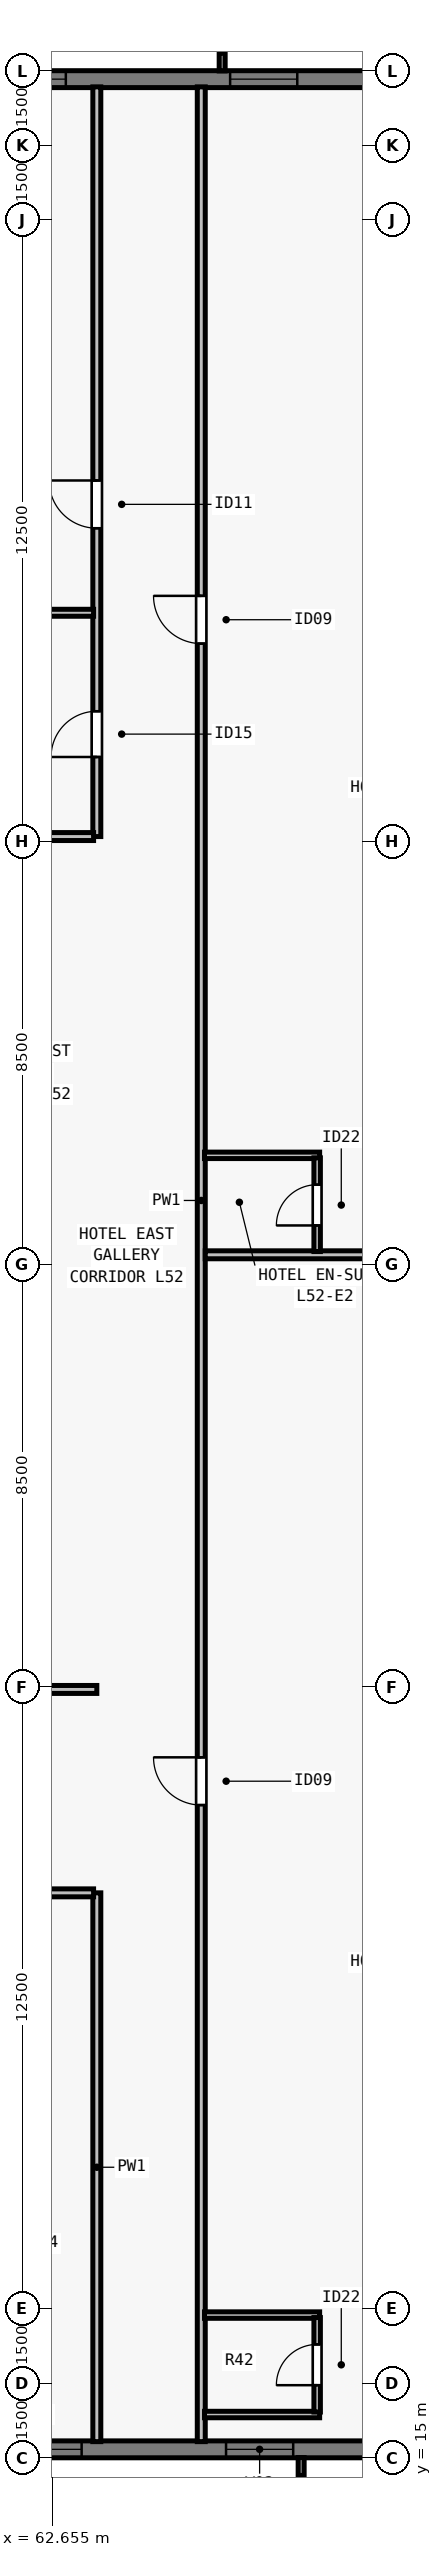
"""IFC4 building model, lengths in metres.
Left out: names, types, materials, properties, quantities, classifications, styles, units other than length and angle.
Written with IfcOpenShell. Run it as: python <this file> out.ifc"""

import sys

from ifc_helpers import new_model, si_unit, direction, frame, frame_2d, origin, place, context, subcontext, project, spatial, rectangle, extrude, element, fill, save


model = new_model("IFC4")
c1 = context("Model", 3, precision=1e-05, world=origin(), true_north=direction((0.0, 1.0)))
c2 = subcontext(c1, "Body", "Model", "MODEL_VIEW")
j1 = project(units=[si_unit("LENGTHUNIT", "METRE"), si_unit("PLANEANGLEUNIT", "RADIAN")], contexts=[c1])
p1 = place(None, origin())
s1 = spatial("IfcSite", under=j1, at=p1, CompositionType="ELEMENT")
p2 = place(p1, origin())
s2 = spatial("IfcBuilding", under=s1, at=p2, CompositionType="ELEMENT")
p3 = place(p2, frame((0.0, 0.0, 190.0)))
s3 = spatial("IfcBuildingStorey", under=s2, at=p3, CompositionType="ELEMENT", Elevation=190.0)
p4 = place(p3, frame((72.0, 15.17, 0.0), z_axis=(0.0, 0.0, 1.0), x_axis=(-1.0, 0.0, 0.0)))
e1 = element("IfcWall", 1, at=p4, inside=s3, PredefinedType="SOLIDWALL", context=c2, shape_type="SweptSolid", body=[
    extrude(rectangle(XDim=39.682, YDim=0.34, at=frame_2d((19.841, 0.0))), origin(), (0.0, 0.0, 1.0), 3.24),
])
p5 = place(p4, frame((4.502, 0.0, 0.8)))
e2 = element("IfcOpeningElement", 2, at=p5, cuts=e1, PredefinedType="OPENING", context=c2, shape_type="SweptSolid", body=[
    extrude(rectangle(XDim=1.35, YDim=1.62, at=frame_2d((0.675, 0.81))), frame((0.0, 0.18, 0.0), z_axis=(0.0, -1.0, 0.0), x_axis=(1.0, 0.0, 0.0)), (0.0, 0.0, 1.0), 0.36),
])
p6 = place(p4, frame((8.755, 0.0, 0.8)))
e3 = element("IfcOpeningElement", 3, at=p6, cuts=e1, PredefinedType="OPENING", context=c2, shape_type="SweptSolid", body=[
    extrude(rectangle(XDim=1.75, YDim=1.62, at=frame_2d((0.875, 0.81))), frame((0.0, 0.18, 0.0), z_axis=(0.0, -1.0, 0.0), x_axis=(1.0, 0.0, 0.0)), (0.0, 0.0, 1.0), 0.36),
])
p7 = place(p4, frame((12.059, 0.0, 0.8)))
e4 = element("IfcOpeningElement", 4, at=p7, cuts=e1, PredefinedType="OPENING", context=c2, shape_type="SweptSolid", body=[
    extrude(rectangle(XDim=1.35, YDim=1.62, at=frame_2d((0.675, 0.81))), frame((0.0, 0.18, 0.0), z_axis=(0.0, -1.0, 0.0), x_axis=(1.0, 0.0, 0.0)), (0.0, 0.0, 1.0), 0.36),
])
p8 = place(p4, frame((16.262, 0.0, 0.8)))
e5 = element("IfcOpeningElement", 5, at=p8, cuts=e1, PredefinedType="OPENING", context=c2, shape_type="SweptSolid", body=[
    extrude(rectangle(XDim=1.75, YDim=1.62, at=frame_2d((0.875, 0.81))), frame((0.0, 0.18, 0.0), z_axis=(0.0, -1.0, 0.0), x_axis=(1.0, 0.0, 0.0)), (0.0, 0.0, 1.0), 0.36),
])
p9 = place(p4, frame((20.016, 0.0, 0.8)))
e6 = element("IfcOpeningElement", 6, at=p9, cuts=e1, PredefinedType="OPENING", context=c2, shape_type="SweptSolid", body=[
    extrude(rectangle(XDim=1.35, YDim=1.62, at=frame_2d((0.675, 0.81))), frame((0.0, 0.18, 0.0), z_axis=(0.0, -1.0, 0.0), x_axis=(1.0, 0.0, 0.0)), (0.0, 0.0, 1.0), 0.36),
])
p10 = place(p4, frame((22.07, 0.0, 0.8)))
e7 = element("IfcOpeningElement", 7, at=p10, cuts=e1, PredefinedType="OPENING", context=c2, shape_type="SweptSolid", body=[
    extrude(rectangle(XDim=1.75, YDim=1.62, at=frame_2d((0.875, 0.81))), frame((0.0, 0.18, 0.0), z_axis=(0.0, -1.0, 0.0), x_axis=(1.0, 0.0, 0.0)), (0.0, 0.0, 1.0), 0.36),
])
p11 = place(p4, frame((26.273, 0.0, 0.8)))
e8 = element("IfcOpeningElement", 8, at=p11, cuts=e1, PredefinedType="OPENING", context=c2, shape_type="SweptSolid", body=[
    extrude(rectangle(XDim=1.35, YDim=1.62, at=frame_2d((0.675, 0.81))), frame((0.0, 0.18, 0.0), z_axis=(0.0, -1.0, 0.0), x_axis=(1.0, 0.0, 0.0)), (0.0, 0.0, 1.0), 0.36),
])
p12 = place(p4, frame((28.377, 0.0, 0.8)))
e9 = element("IfcOpeningElement", 9, at=p12, cuts=e1, PredefinedType="OPENING", context=c2, shape_type="SweptSolid", body=[
    extrude(rectangle(XDim=1.75, YDim=1.62, at=frame_2d((0.875, 0.81))), frame((0.0, 0.18, 0.0), z_axis=(0.0, -1.0, 0.0), x_axis=(1.0, 0.0, 0.0)), (0.0, 0.0, 1.0), 0.36),
])
p13 = place(p4, frame((33.38, 0.0, 0.8)))
e10 = element("IfcOpeningElement", 10, at=p13, cuts=e1, PredefinedType="OPENING", context=c2, shape_type="SweptSolid", body=[
    extrude(rectangle(XDim=1.35, YDim=1.62, at=frame_2d((0.675, 0.81))), frame((0.0, 0.18, 0.0), z_axis=(0.0, -1.0, 0.0), x_axis=(1.0, 0.0, 0.0)), (0.0, 0.0, 1.0), 0.36),
])
p14 = place(p3, frame((32.0, 62.83, 0.0), z_axis=(0.0, 0.0, 1.0), x_axis=(1.0, 0.0, 0.0)))
e11 = element("IfcWall", 11, at=p14, inside=s3, PredefinedType="SOLIDWALL", context=c2, shape_type="SweptSolid", body=[
    extrude(rectangle(XDim=39.682, YDim=0.34, at=frame_2d((19.841, 0.0))), origin(), (0.0, 0.0, 1.0), 3.24),
])
p15 = place(p14, frame((4.952, 0.0, 0.8)))
e12 = element("IfcOpeningElement", 12, at=p15, cuts=e11, PredefinedType="OPENING", context=c2, shape_type="SweptSolid", body=[
    extrude(rectangle(XDim=1.35, YDim=1.62, at=frame_2d((0.675, 0.81))), frame((0.0, 0.18, 0.0), z_axis=(0.0, -1.0, 0.0), x_axis=(1.0, 0.0, 0.0)), (0.0, 0.0, 1.0), 0.36),
])
p16 = place(p14, frame((12.059, 0.0, 0.8)))
e13 = element("IfcOpeningElement", 13, at=p16, cuts=e11, PredefinedType="OPENING", context=c2, shape_type="SweptSolid", body=[
    extrude(rectangle(XDim=1.35, YDim=1.62, at=frame_2d((0.675, 0.81))), frame((0.0, 0.18, 0.0), z_axis=(0.0, -1.0, 0.0), x_axis=(1.0, 0.0, 0.0)), (0.0, 0.0, 1.0), 0.36),
])
p17 = place(p14, frame((16.262, 0.0, 0.8)))
e14 = element("IfcOpeningElement", 14, at=p17, cuts=e11, PredefinedType="OPENING", context=c2, shape_type="SweptSolid", body=[
    extrude(rectangle(XDim=1.75, YDim=1.62, at=frame_2d((0.875, 0.81))), frame((0.0, 0.18, 0.0), z_axis=(0.0, -1.0, 0.0), x_axis=(1.0, 0.0, 0.0)), (0.0, 0.0, 1.0), 0.36),
])
p18 = place(p14, frame((19.166, 0.0, 0.8)))
e15 = element("IfcOpeningElement", 15, at=p18, cuts=e11, PredefinedType="OPENING", context=c2, shape_type="SweptSolid", body=[
    extrude(rectangle(XDim=1.35, YDim=1.62, at=frame_2d((0.675, 0.81))), frame((0.0, 0.18, 0.0), z_axis=(0.0, -1.0, 0.0), x_axis=(1.0, 0.0, 0.0)), (0.0, 0.0, 1.0), 0.36),
])
p19 = place(p14, frame((22.07, 0.0, 0.8)))
e16 = element("IfcOpeningElement", 16, at=p19, cuts=e11, PredefinedType="OPENING", context=c2, shape_type="SweptSolid", body=[
    extrude(rectangle(XDim=1.75, YDim=1.62, at=frame_2d((0.875, 0.81))), frame((0.0, 0.18, 0.0), z_axis=(0.0, -1.0, 0.0), x_axis=(1.0, 0.0, 0.0)), (0.0, 0.0, 1.0), 0.36),
])
p20 = place(p14, frame((26.273, 0.0, 0.8)))
e17 = element("IfcOpeningElement", 17, at=p20, cuts=e11, PredefinedType="OPENING", context=c2, shape_type="SweptSolid", body=[
    extrude(rectangle(XDim=1.35, YDim=1.62, at=frame_2d((0.675, 0.81))), frame((0.0, 0.18, 0.0), z_axis=(0.0, -1.0, 0.0), x_axis=(1.0, 0.0, 0.0)), (0.0, 0.0, 1.0), 0.36),
])
p21 = place(p14, frame((29.177, 0.0, 0.8)))
e18 = element("IfcOpeningElement", 18, at=p21, cuts=e11, PredefinedType="OPENING", context=c2, shape_type="SweptSolid", body=[
    extrude(rectangle(XDim=1.75, YDim=1.62, at=frame_2d((0.875, 0.81))), frame((0.0, 0.18, 0.0), z_axis=(0.0, -1.0, 0.0), x_axis=(1.0, 0.0, 0.0)), (0.0, 0.0, 1.0), 0.36),
])
p22 = place(p14, frame((34.23, 0.0, 0.8)))
e19 = element("IfcOpeningElement", 19, at=p22, cuts=e11, PredefinedType="OPENING", context=c2, shape_type="SweptSolid", body=[
    extrude(rectangle(XDim=1.35, YDim=1.62, at=frame_2d((0.675, 0.81))), frame((0.0, 0.18, 0.0), z_axis=(0.0, -1.0, 0.0), x_axis=(1.0, 0.0, 0.0)), (0.0, 0.0, 1.0), 0.36),
])
p23 = place(p3, frame((65.65, 15.325, 0.0), z_axis=(0.0, 0.0, 1.0), x_axis=(0.0, 1.0, 0.0)))
e20 = element("IfcWall", 20, at=p23, inside=s3, PredefinedType="PARTITIONING", context=c2, shape_type="SweptSolid", body=[
    extrude(rectangle(XDim=47.35, YDim=0.16, at=frame_2d((23.675, 0.0))), origin(), (0.0, 0.0, 1.0), 2.515),
])
p24 = place(p23, frame((12.8, 0.0, 0.0)))
e21 = element("IfcOpeningElement", 21, at=p24, cuts=e20, PredefinedType="OPENING", context=c2, shape_type="SweptSolid", body=[
    extrude(rectangle(XDim=0.96, YDim=2.15, at=frame_2d((0.48, 1.075))), frame((0.0, 0.09, 0.0), z_axis=(0.0, -1.0, 0.0), x_axis=(1.0, 0.0, 0.0)), (0.0, 0.0, 1.0), 0.18),
])
p25 = place(p23, frame((36.155, 0.0, 0.0)))
e22 = element("IfcOpeningElement", 22, at=p25, cuts=e20, PredefinedType="OPENING", context=c2, shape_type="SweptSolid", body=[
    extrude(rectangle(XDim=0.96, YDim=2.15, at=frame_2d((0.48, 1.075))), frame((0.0, 0.09, 0.0), z_axis=(0.0, -1.0, 0.0), x_axis=(1.0, 0.0, 0.0)), (0.0, 0.0, 1.0), 0.18),
])
p26 = place(p3, frame((63.55, 15.325, 0.0), z_axis=(0.0, 0.0, 1.0), x_axis=(0.0, 1.0, 0.0)))
e23 = element("IfcWall", 23, at=p26, inside=s3, PredefinedType="PARTITIONING", context=c2, shape_type="SweptSolid", body=[
    extrude(rectangle(XDim=11.035, YDim=0.16, at=frame_2d((5.518, 0.0))), origin(), (0.0, 0.0, 1.0), 3.24),
])
p27 = place(p3, frame((63.55, 47.6, 0.0), z_axis=(0.0, 0.0, 1.0), x_axis=(0.0, 1.0, 0.0)))
e24 = element("IfcWall", 24, at=p27, inside=s3, PredefinedType="PARTITIONING", context=c2, shape_type="SweptSolid", body=[
    extrude(rectangle(XDim=15.075, YDim=0.16, at=frame_2d((7.538, 0.0))), origin(), (0.0, 0.0, 1.0), 2.515),
])
p28 = place(p27, frame((1.6, 0.0, 0.0)))
e25 = element("IfcOpeningElement", 25, at=p28, cuts=e24, PredefinedType="OPENING", context=c2, shape_type="SweptSolid", body=[
    extrude(rectangle(XDim=0.92, YDim=2.12, at=frame_2d((0.46, 1.06))), frame((0.0, 0.09, 0.0), z_axis=(0.0, -1.0, 0.0), x_axis=(1.0, 0.0, 0.0)), (0.0, 0.0, 1.0), 0.18),
])
p29 = place(p27, frame((6.2, 0.0, 0.0)))
e26 = element("IfcOpeningElement", 26, at=p29, cuts=e24, PredefinedType="OPENING", context=c2, shape_type="SweptSolid", body=[
    extrude(rectangle(XDim=0.96, YDim=2.12, at=frame_2d((0.48, 1.06))), frame((0.0, 0.09, 0.0), z_axis=(0.0, -1.0, 0.0), x_axis=(1.0, 0.0, 0.0)), (0.0, 0.0, 1.0), 0.18),
])
p30 = place(p3, frame((60.765, 30.45, 0.0), z_axis=(0.0, 0.0, 1.0), x_axis=(1.0, 0.0, 0.0)))
e27 = element("IfcWall", 27, at=p30, inside=s3, PredefinedType="PARTITIONING", context=c2, shape_type="SweptSolid", body=[
    extrude(rectangle(XDim=2.785, YDim=0.16, at=frame_2d((1.393, 0.0))), origin(), (0.0, 0.0, 1.0), 3.24),
])
p31 = place(p3, frame((60.765, 47.6, 0.0), z_axis=(0.0, 0.0, 1.0), x_axis=(1.0, 0.0, 0.0)))
e28 = element("IfcWall", 28, at=p31, inside=s3, PredefinedType="PARTITIONING", context=c2, shape_type="SweptSolid", body=[
    extrude(rectangle(XDim=2.72, YDim=0.16, at=frame_2d((1.36, 0.0))), origin(), (0.0, 0.0, 1.0), 3.24),
])
p32 = place(p3, frame((41.415, 26.36, 0.0), z_axis=(0.0, 0.0, 1.0), x_axis=(1.0, 0.0, 0.0)))
e29 = element("IfcWall", 29, at=p32, inside=s3, PredefinedType="PARTITIONING", context=c2, shape_type="SweptSolid", body=[
    extrude(rectangle(XDim=22.07, YDim=0.16, at=frame_2d((11.035, 0.0))), origin(), (0.0, 0.0, 1.0), 3.24),
])
p33 = place(p32, frame((3.331, 0.0, 0.0)))
e30 = element("IfcOpeningElement", 30, at=p33, cuts=e29, PredefinedType="OPENING", context=c2, shape_type="SweptSolid", body=[
    extrude(rectangle(XDim=0.96, YDim=2.15, at=frame_2d((0.48, 1.075))), frame((0.0, 0.09, 0.0), z_axis=(0.0, -1.0, 0.0), x_axis=(1.0, 0.0, 0.0)), (0.0, 0.0, 1.0), 0.18),
])
p34 = place(p32, frame((8.83, 0.0, 0.0)))
e31 = element("IfcOpeningElement", 31, at=p34, cuts=e29, PredefinedType="OPENING", context=c2, shape_type="SweptSolid", body=[
    extrude(rectangle(XDim=0.96, YDim=2.15, at=frame_2d((0.48, 1.075))), frame((0.0, 0.09, 0.0), z_axis=(0.0, -1.0, 0.0), x_axis=(1.0, 0.0, 0.0)), (0.0, 0.0, 1.0), 0.18),
])
p35 = place(p32, frame((14.192, 0.0, 0.0)))
e32 = element("IfcOpeningElement", 32, at=p35, cuts=e29, PredefinedType="OPENING", context=c2, shape_type="SweptSolid", body=[
    extrude(rectangle(XDim=0.96, YDim=2.15, at=frame_2d((0.48, 1.075))), frame((0.0, 0.09, 0.0), z_axis=(0.0, -1.0, 0.0), x_axis=(1.0, 0.0, 0.0)), (0.0, 0.0, 1.0), 0.18),
])
p36 = place(p32, frame((19.735, 0.0, 0.0)))
e33 = element("IfcOpeningElement", 33, at=p36, cuts=e29, PredefinedType="OPENING", context=c2, shape_type="SweptSolid", body=[
    extrude(rectangle(XDim=0.96, YDim=2.15, at=frame_2d((0.48, 1.075))), frame((0.0, 0.09, 0.0), z_axis=(0.0, -1.0, 0.0), x_axis=(1.0, 0.0, 0.0)), (0.0, 0.0, 1.0), 0.18),
])
p37 = place(p3, frame((53.555, 52.1, 0.0), z_axis=(0.0, 0.0, 1.0), x_axis=(1.0, 0.0, 0.0)))
e34 = element("IfcWall", 34, at=p37, inside=s3, PredefinedType="PARTITIONING", context=c2, shape_type="SweptSolid", body=[
    extrude(rectangle(XDim=9.93, YDim=0.14, at=frame_2d((4.965, 0.0))), origin(), (0.0, 0.0, 1.0), 3.24),
])
for number, where, z_axis, x_axis in (
    (35, (65.715, 15.87, 0.0), (0.0, 0.0, 1.0), (1.0, 0.0, 0.0)),
    (36, (65.715, 17.87, 0.0), (0.0, 0.0, 1.0), (1.0, 0.0, 0.0)),
):
    element("IfcWall", number, at=place(p3, frame(where, z_axis=z_axis, x_axis=x_axis)), inside=s3, PredefinedType="PLUMBINGWALL", context=c2, shape_type="SweptSolid", body=[
        extrude(rectangle(XDim=2.315, YDim=0.13, at=frame_2d((1.157, 0.0))), origin(), (0.0, 0.0, 1.0), 3.24),
    ])
p38 = place(p3, frame((67.98, 15.92, 0.0), z_axis=(0.0, 0.0, 1.0), x_axis=(0.0, 1.0, 0.0)))
e37 = element("IfcWall", 37, at=p38, inside=s3, PredefinedType="PLUMBINGWALL", context=c2, shape_type="SweptSolid", body=[
    extrude(rectangle(XDim=1.9, YDim=0.13, at=frame_2d((0.95, 0.0))), origin(), (0.0, 0.0, 1.0), 3.24),
])
p39 = place(p38, frame((0.54, 0.0, 0.0)))
e38 = element("IfcOpeningElement", 38, at=p39, cuts=e37, PredefinedType="OPENING", context=c2, shape_type="SweptSolid", body=[
    extrude(rectangle(XDim=0.82, YDim=2.1, at=frame_2d((0.41, 1.05))), frame((0.0, 0.075, 0.0), z_axis=(0.0, -1.0, 0.0), x_axis=(1.0, 0.0, 0.0)), (0.0, 0.0, 1.0), 0.15),
])
p40 = place(p3, frame((65.73, 39.19, 0.0), z_axis=(0.0, 0.0, 1.0), x_axis=(1.0, 0.0, 0.0)))
e39 = element("IfcWall", 39, at=p40, inside=s3, PredefinedType="PARTITIONING", context=c2, shape_type="SweptSolid", body=[
    extrude(rectangle(XDim=10.0, YDim=0.16, at=frame_2d((5.0, 0.0))), origin(), (0.0, 0.0, 1.0), 3.24),
])
p41 = place(p3, frame((65.715, 41.19, 0.0), z_axis=(0.0, 0.0, 1.0), x_axis=(1.0, 0.0, 0.0)))
e40 = element("IfcWall", 40, at=p41, inside=s3, PredefinedType="PLUMBINGWALL", context=c2, shape_type="SweptSolid", body=[
    extrude(rectangle(XDim=2.315, YDim=0.13, at=frame_2d((1.157, 0.0))), origin(), (0.0, 0.0, 1.0), 3.24),
])
p42 = place(p3, frame((67.98, 39.255, 0.0), z_axis=(0.0, 0.0, 1.0), x_axis=(0.0, 1.0, 0.0)))
e41 = element("IfcWall", 41, at=p42, inside=s3, PredefinedType="PLUMBINGWALL", context=c2, shape_type="SweptSolid", body=[
    extrude(rectangle(XDim=1.885, YDim=0.13, at=frame_2d((0.942, 0.0))), origin(), (0.0, 0.0, 1.0), 3.24),
])
p43 = place(p42, frame((0.525, 0.0, 0.0)))
e42 = element("IfcOpeningElement", 42, at=p43, cuts=e41, PredefinedType="OPENING", context=c2, shape_type="SweptSolid", body=[
    extrude(rectangle(XDim=0.82, YDim=2.1, at=frame_2d((0.41, 1.05))), frame((0.0, 0.075, 0.0), z_axis=(0.0, -1.0, 0.0), x_axis=(1.0, 0.0, 0.0)), (0.0, 0.0, 1.0), 0.15),
])
p44 = place(p5, origin())
e43 = element("IfcWindow", 43, at=p44, inside=s3, PartitioningType="SINGLE_PANEL", PredefinedType="WINDOW", context=c2, shape_type="SweptSolid", body=[
    extrude(rectangle(XDim=1.35, YDim=1.62, at=frame_2d((0.675, 0.81))), frame((0.0, -0.05, 0.0), z_axis=(0.0, -1.0, 0.0), x_axis=(1.0, 0.0, 0.0)), (0.0, 0.0, 1.0), 0.06),
])
fill(e2, e43)
p45 = place(p6, origin())
e44 = element("IfcWindow", 44, at=p45, inside=s3, PartitioningType="SINGLE_PANEL", PredefinedType="WINDOW", context=c2, shape_type="SweptSolid", body=[
    extrude(rectangle(XDim=1.75, YDim=1.62, at=frame_2d((0.875, 0.81))), frame((0.0, -0.05, 0.0), z_axis=(0.0, -1.0, 0.0), x_axis=(1.0, 0.0, 0.0)), (0.0, 0.0, 1.0), 0.06),
])
fill(e3, e44)
p46 = place(p21, origin())
e45 = element("IfcWindow", 45, at=p46, inside=s3, PartitioningType="SINGLE_PANEL", PredefinedType="WINDOW", context=c2, shape_type="SweptSolid", body=[
    extrude(rectangle(XDim=1.75, YDim=1.62, at=frame_2d((0.875, 0.81))), frame((0.0, -0.05, 0.0), z_axis=(0.0, -1.0, 0.0), x_axis=(1.0, 0.0, 0.0)), (0.0, 0.0, 1.0), 0.06),
])
fill(e18, e45)
p47 = place(p22, origin())
e46 = element("IfcWindow", 46, at=p47, inside=s3, PartitioningType="SINGLE_PANEL", PredefinedType="WINDOW", context=c2, shape_type="SweptSolid", body=[
    extrude(rectangle(XDim=1.35, YDim=1.62, at=frame_2d((0.675, 0.81))), frame((0.0, -0.05, 0.0), z_axis=(0.0, -1.0, 0.0), x_axis=(1.0, 0.0, 0.0)), (0.0, 0.0, 1.0), 0.06),
])
fill(e19, e46)
p48 = place(p28, origin())
e47 = element("IfcDoor", 47, at=p48, inside=s3, OperationType="SINGLE_SWING_LEFT", PredefinedType="DOOR", context=c2, shape_type="SweptSolid", body=[
    extrude(rectangle(XDim=0.92, YDim=2.12, at=frame_2d((0.46, 1.06))), frame((0.0, 0.025, 0.0), z_axis=(0.0, -1.0, 0.0), x_axis=(1.0, 0.0, 0.0)), (0.0, 0.0, 1.0), 0.05),
])
fill(e25, e47)
p49 = place(p29, origin())
e48 = element("IfcDoor", 48, at=p49, inside=s3, OperationType="SINGLE_SWING_RIGHT", PredefinedType="DOOR", context=c2, shape_type="SweptSolid", body=[
    extrude(rectangle(XDim=0.96, YDim=2.12, at=frame_2d((0.48, 1.06))), frame((0.0, 0.025, 0.0), z_axis=(0.0, -1.0, 0.0), x_axis=(1.0, 0.0, 0.0)), (0.0, 0.0, 1.0), 0.05),
])
fill(e26, e48)
p50 = place(p39, origin())
e49 = element("IfcDoor", 49, at=p50, inside=s3, OperationType="SINGLE_SWING_LEFT", PredefinedType="DOOR", context=c2, shape_type="SweptSolid", body=[
    extrude(rectangle(XDim=0.82, YDim=2.1, at=frame_2d((0.41, 1.05))), frame((0.0, 0.025, 0.0), z_axis=(0.0, -1.0, 0.0), x_axis=(1.0, 0.0, 0.0)), (0.0, 0.0, 1.0), 0.05),
])
fill(e38, e49)
p51 = place(p24, origin())
e50 = element("IfcDoor", 50, at=p51, inside=s3, OperationType="SINGLE_SWING_RIGHT", PredefinedType="DOOR", context=c2, shape_type="SweptSolid", body=[
    extrude(rectangle(XDim=0.96, YDim=2.15, at=frame_2d((0.48, 1.075))), frame((0.0, 0.025, 0.0), z_axis=(0.0, -1.0, 0.0), x_axis=(1.0, 0.0, 0.0)), (0.0, 0.0, 1.0), 0.05),
])
fill(e21, e50)
p52 = place(p43, origin())
e51 = element("IfcDoor", 51, at=p52, inside=s3, OperationType="SINGLE_SWING_LEFT", PredefinedType="DOOR", context=c2, shape_type="SweptSolid", body=[
    extrude(rectangle(XDim=0.82, YDim=2.1, at=frame_2d((0.41, 1.05))), frame((0.0, 0.025, 0.0), z_axis=(0.0, -1.0, 0.0), x_axis=(1.0, 0.0, 0.0)), (0.0, 0.0, 1.0), 0.05),
])
fill(e42, e51)
p53 = place(p25, origin())
e52 = element("IfcDoor", 52, at=p53, inside=s3, OperationType="SINGLE_SWING_RIGHT", PredefinedType="DOOR", context=c2, shape_type="SweptSolid", body=[
    extrude(rectangle(XDim=0.96, YDim=2.15, at=frame_2d((0.48, 1.075))), frame((0.0, 0.025, 0.0), z_axis=(0.0, -1.0, 0.0), x_axis=(1.0, 0.0, 0.0)), (0.0, 0.0, 1.0), 0.05),
])
fill(e22, e52)
save(model, sys.argv[1])
